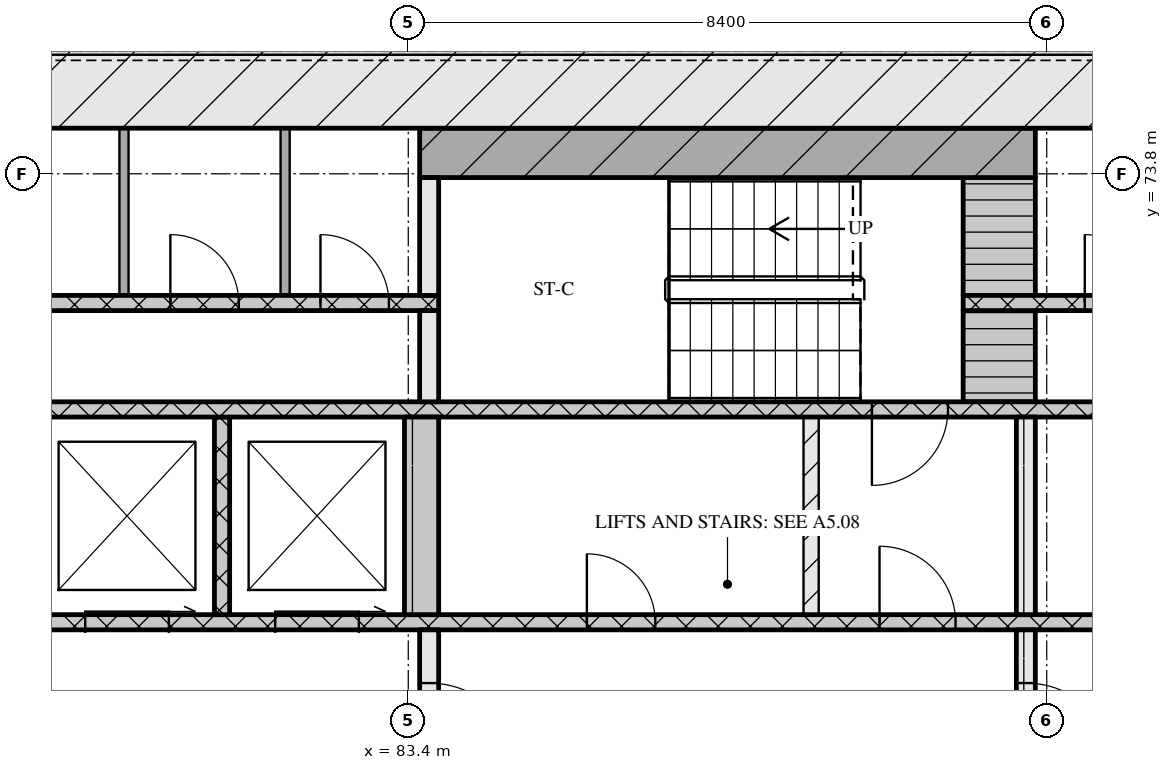
"""IFC4 building model, lengths in metres.
Left out: names, types, materials, properties, quantities, classifications, styles, units other than length and angle.
Written with IfcOpenShell. Run it as: python <this file> out.ifc"""

import sys

from ifc_helpers import new_model, si_unit, direction, frame, frame_2d, origin, place, context, subcontext, project, spatial, rectangle, extrude, element, fill, save


model = new_model("IFC4")
c1 = context("Model", 3, precision=1e-05, world=origin(), true_north=direction((0.0, 1.0)))
c2 = subcontext(c1, "Body", "Model", "MODEL_VIEW")
j1 = project(units=[si_unit("LENGTHUNIT", "METRE"), si_unit("PLANEANGLEUNIT", "RADIAN")], contexts=[c1])
p1 = place(None, origin())
s1 = spatial("IfcSite", under=j1, at=p1, CompositionType="ELEMENT")
p2 = place(p1, origin())
s2 = spatial("IfcBuilding", under=s1, at=p2, CompositionType="ELEMENT")
p3 = place(p2, frame((0.0, 0.0, 55.2)))
s3 = spatial("IfcBuildingStorey", under=s2, at=p3, CompositionType="ELEMENT", Elevation=55.2)
p4 = place(p3, frame((66.6, 75.0, 0.0), z_axis=(0.0, 0.0, 1.0), x_axis=(1.0, 0.0, 0.0)))
e1 = element("IfcWall", 1, at=p4, inside=s3, PredefinedType="SOLIDWALL", context=c2, shape_type="SweptSolid", body=[
    extrude(rectangle(XDim=42.0, YDim=1.2, at=frame_2d((21.0, 0.0))), origin(), (0.0, 0.0, 1.0), 3.32),
])
p5 = place(p3, frame((83.675, 65.2, 0.0), z_axis=(0.0, 0.0, 1.0), x_axis=(0.0, 1.0, 0.0)))
e2 = element("IfcWall", 2, at=p5, inside=s3, PredefinedType="SOLIDWALL", context=c2, shape_type="SweptSolid", body=[
    extrude(rectangle(XDim=2.6, YDim=0.25, at=frame_2d((1.3, 0.0))), origin(), (0.0, 0.0, 1.0), 3.32),
])
p6 = place(p5, frame((0.7, 0.0, 0.0)))
e3 = element("IfcOpeningElement", 3, at=p6, cuts=e2, PredefinedType="OPENING", context=c2, shape_type="SweptSolid", body=[
    extrude(rectangle(XDim=1.2, YDim=2.1, at=frame_2d((0.6, 1.05))), frame((0.0, 0.135, 0.0), z_axis=(0.0, -1.0, 0.0), x_axis=(1.0, 0.0, 0.0)), (0.0, 0.0, 1.0), 0.27),
])
p7 = place(p3, frame((91.525, 65.2, 0.0), z_axis=(0.0, 0.0, 1.0), x_axis=(0.0, 1.0, 0.0)))
e4 = element("IfcWall", 4, at=p7, inside=s3, PredefinedType="SOLIDWALL", context=c2, shape_type="SweptSolid", body=[
    extrude(rectangle(XDim=2.6, YDim=0.25, at=frame_2d((1.3, 0.0))), origin(), (0.0, 0.0, 1.0), 3.32),
])
p8 = place(p7, frame((0.7, 0.0, 0.0)))
e5 = element("IfcOpeningElement", 5, at=p8, cuts=e4, PredefinedType="OPENING", context=c2, shape_type="SweptSolid", body=[
    extrude(rectangle(XDim=1.2, YDim=2.1, at=frame_2d((0.6, 1.05))), frame((0.0, 0.135, 0.0), z_axis=(0.0, -1.0, 0.0), x_axis=(1.0, 0.0, 0.0)), (0.0, 0.0, 1.0), 0.27),
])
p9 = place(p3, frame((76.05, 67.9, 0.0), z_axis=(0.0, 0.0, 1.0), x_axis=(1.0, 0.0, 0.0)))
e6 = element("IfcWall", 6, at=p9, inside=s3, PredefinedType="SOLIDWALL", context=c2, shape_type="SweptSolid", body=[
    extrude(rectangle(XDim=23.1, YDim=0.2, at=frame_2d((11.55, 0.0))), origin(), (0.0, 0.0, 1.0), 3.32),
])
p10 = place(p9, frame((0.6, 0.0, 0.0)))
e7 = element("IfcOpeningElement", 7, at=p10, cuts=e6, PredefinedType="OPENING", context=c2, shape_type="SweptSolid", body=[
    extrude(rectangle(XDim=1.1, YDim=2.1, at=frame_2d((0.55, 1.05))), frame((0.0, 0.11, 0.0), z_axis=(0.0, -1.0, 0.0), x_axis=(1.0, 0.0, 0.0)), (0.0, 0.0, 1.0), 0.22),
])
p11 = place(p9, frame((3.1, 0.0, 0.0)))
e8 = element("IfcOpeningElement", 8, at=p11, cuts=e6, PredefinedType="OPENING", context=c2, shape_type="SweptSolid", body=[
    extrude(rectangle(XDim=1.1, YDim=2.1, at=frame_2d((0.55, 1.05))), frame((0.0, 0.11, 0.0), z_axis=(0.0, -1.0, 0.0), x_axis=(1.0, 0.0, 0.0)), (0.0, 0.0, 1.0), 0.22),
])
p12 = place(p9, frame((5.6, 0.0, 0.0)))
e9 = element("IfcOpeningElement", 9, at=p12, cuts=e6, PredefinedType="OPENING", context=c2, shape_type="SweptSolid", body=[
    extrude(rectangle(XDim=1.1, YDim=2.1, at=frame_2d((0.55, 1.05))), frame((0.0, 0.11, 0.0), z_axis=(0.0, -1.0, 0.0), x_axis=(1.0, 0.0, 0.0)), (0.0, 0.0, 1.0), 0.22),
])
p13 = place(p9, frame((9.7, 0.0, 0.0)))
e10 = element("IfcOpeningElement", 10, at=p13, cuts=e6, PredefinedType="OPENING", context=c2, shape_type="SweptSolid", body=[
    extrude(rectangle(XDim=0.9, YDim=2.1, at=frame_2d((0.45, 1.05))), frame((0.0, 0.11, 0.0), z_axis=(0.0, -1.0, 0.0), x_axis=(1.0, 0.0, 0.0)), (0.0, 0.0, 1.0), 0.22),
])
p14 = place(p9, frame((13.55, 0.0, 0.0)))
e11 = element("IfcOpeningElement", 11, at=p14, cuts=e6, PredefinedType="OPENING", context=c2, shape_type="SweptSolid", body=[
    extrude(rectangle(XDim=1.0, YDim=2.1, at=frame_2d((0.5, 1.05))), frame((0.0, 0.11, 0.0), z_axis=(0.0, -1.0, 0.0), x_axis=(1.0, 0.0, 0.0)), (0.0, 0.0, 1.0), 0.22),
])
p15 = place(p3, frame((80.95, 68.0, 0.0), z_axis=(0.0, 0.0, 1.0), x_axis=(0.0, 1.0, 0.0)))
e12 = element("IfcWall", 12, at=p15, inside=s3, PredefinedType="SOLIDWALL", context=c2, shape_type="SweptSolid", body=[
    extrude(rectangle(XDim=2.6, YDim=0.2, at=frame_2d((1.3, 0.0))), origin(), (0.0, 0.0, 1.0), 3.32),
])
p16 = place(p3, frame((83.575, 68.0, 0.0), z_axis=(0.0, 0.0, 1.0), x_axis=(0.0, 1.0, 0.0)))
e13 = element("IfcWall", 13, at=p16, inside=s3, PredefinedType="SOLIDWALL", context=c2, shape_type="SweptSolid", body=[
    extrude(rectangle(XDim=2.6, YDim=0.45, at=frame_2d((1.3, 0.0))), origin(), (0.0, 0.0, 1.0), 3.32),
])
p17 = place(p3, frame((88.7, 68.0, 0.0), z_axis=(0.0, 0.0, 1.0), x_axis=(0.0, 1.0, 0.0)))
e14 = element("IfcWall", 14, at=p17, inside=s3, PredefinedType="PARTITIONING", context=c2, shape_type="SweptSolid", body=[
    extrude(rectangle(XDim=2.6, YDim=0.2, at=frame_2d((1.3, 0.0))), origin(), (0.0, 0.0, 1.0), 3.32),
])
p18 = place(p3, frame((91.525, 68.0, 0.0), z_axis=(0.0, 0.0, 1.0), x_axis=(0.0, 1.0, 0.0)))
e15 = element("IfcWall", 15, at=p18, inside=s3, PredefinedType="SOLIDWALL", context=c2, shape_type="SweptSolid", body=[
    extrude(rectangle(XDim=2.6, YDim=0.25, at=frame_2d((1.3, 0.0))), origin(), (0.0, 0.0, 1.0), 3.32),
])
p19 = place(p3, frame((67.8, 70.7, 0.0), z_axis=(0.0, 0.0, 1.0), x_axis=(1.0, 0.0, 0.0)))
e16 = element("IfcWall", 16, at=p19, inside=s3, PredefinedType="SOLIDWALL", context=c2, shape_type="SweptSolid", body=[
    extrude(rectangle(XDim=39.6, YDim=0.2, at=frame_2d((19.8, 0.0))), origin(), (0.0, 0.0, 1.0), 3.32),
])
p20 = place(p19, frame((0.65, 0.0, 0.0)))
e17 = element("IfcOpeningElement", 17, at=p20, cuts=e16, PredefinedType="OPENING", context=c2, shape_type="SweptSolid", body=[
    extrude(rectangle(XDim=1.1, YDim=2.1, at=frame_2d((0.55, 1.05))), frame((0.0, 0.11, 0.0), z_axis=(0.0, -1.0, 0.0), x_axis=(1.0, 0.0, 0.0)), (0.0, 0.0, 1.0), 0.22),
])
p21 = place(p19, frame((3.25, 0.0, 0.0)))
e18 = element("IfcOpeningElement", 18, at=p21, cuts=e16, PredefinedType="OPENING", context=c2, shape_type="SweptSolid", body=[
    extrude(rectangle(XDim=1.1, YDim=2.1, at=frame_2d((0.55, 1.05))), frame((0.0, 0.11, 0.0), z_axis=(0.0, -1.0, 0.0), x_axis=(1.0, 0.0, 0.0)), (0.0, 0.0, 1.0), 0.22),
])
p22 = place(p19, frame((5.9, 0.0, 0.0)))
e19 = element("IfcOpeningElement", 19, at=p22, cuts=e16, PredefinedType="OPENING", context=c2, shape_type="SweptSolid", body=[
    extrude(rectangle(XDim=1.0, YDim=2.1, at=frame_2d((0.5, 1.05))), frame((0.0, 0.11, 0.0), z_axis=(0.0, -1.0, 0.0), x_axis=(1.0, 0.0, 0.0)), (0.0, 0.0, 1.0), 0.22),
])
p23 = place(p19, frame((21.7, 0.0, 0.0)))
e20 = element("IfcOpeningElement", 20, at=p23, cuts=e16, PredefinedType="OPENING", context=c2, shape_type="SweptSolid", body=[
    extrude(rectangle(XDim=1.0, YDim=2.1, at=frame_2d((0.5, 1.05))), frame((0.0, 0.11, 0.0), z_axis=(0.0, -1.0, 0.0), x_axis=(1.0, 0.0, 0.0)), (0.0, 0.0, 1.0), 0.22),
])
p24 = place(p19, frame((32.7, 0.0, 0.0)))
e21 = element("IfcOpeningElement", 21, at=p24, cuts=e16, PredefinedType="OPENING", context=c2, shape_type="SweptSolid", body=[
    extrude(rectangle(XDim=1.0, YDim=2.1, at=frame_2d((0.5, 1.05))), frame((0.0, 0.11, 0.0), z_axis=(0.0, -1.0, 0.0), x_axis=(1.0, 0.0, 0.0)), (0.0, 0.0, 1.0), 0.22),
])
p25 = place(p19, frame((35.25, 0.0, 0.0)))
e22 = element("IfcOpeningElement", 22, at=p25, cuts=e16, PredefinedType="OPENING", context=c2, shape_type="SweptSolid", body=[
    extrude(rectangle(XDim=1.1, YDim=2.1, at=frame_2d((0.55, 1.05))), frame((0.0, 0.11, 0.0), z_axis=(0.0, -1.0, 0.0), x_axis=(1.0, 0.0, 0.0)), (0.0, 0.0, 1.0), 0.22),
])
p26 = place(p19, frame((37.85, 0.0, 0.0)))
e23 = element("IfcOpeningElement", 23, at=p26, cuts=e16, PredefinedType="OPENING", context=c2, shape_type="SweptSolid", body=[
    extrude(rectangle(XDim=1.1, YDim=2.1, at=frame_2d((0.55, 1.05))), frame((0.0, 0.11, 0.0), z_axis=(0.0, -1.0, 0.0), x_axis=(1.0, 0.0, 0.0)), (0.0, 0.0, 1.0), 0.22),
])
p27 = place(p3, frame((83.675, 70.8, 0.0), z_axis=(0.0, 0.0, 1.0), x_axis=(0.0, 1.0, 0.0)))
e24 = element("IfcWall", 24, at=p27, inside=s3, PredefinedType="SOLIDWALL", context=c2, shape_type="SweptSolid", body=[
    extrude(rectangle(XDim=1.2, YDim=0.25, at=frame_2d((0.6, 0.0))), origin(), (0.0, 0.0, 1.0), 3.32),
])
p28 = place(p3, frame((91.175, 70.8, 0.0), z_axis=(0.0, 0.0, 1.0), x_axis=(0.0, 1.0, 0.0)))
e25 = element("IfcWall", 25, at=p28, inside=s3, PredefinedType="SOLIDWALL", context=c2, shape_type="SweptSolid", body=[
    extrude(rectangle(XDim=1.2, YDim=0.95, at=frame_2d((0.6, 0.0))), origin(), (0.0, 0.0, 1.0), 3.32),
])
p29 = place(p3, frame((72.8, 72.1, 0.0), z_axis=(0.0, 0.0, 1.0), x_axis=(1.0, 0.0, 0.0)))
e26 = element("IfcWall", 26, at=p29, inside=s3, PredefinedType="SOLIDWALL", context=c2, shape_type="SweptSolid", body=[
    extrude(rectangle(XDim=11.0, YDim=0.2, at=frame_2d((5.5, 0.0))), origin(), (0.0, 0.0, 1.0), 3.32),
])
p30 = place(p29, frame((1.25, 0.0, 0.0)))
e27 = element("IfcOpeningElement", 27, at=p30, cuts=e26, PredefinedType="OPENING", context=c2, shape_type="SweptSolid", body=[
    extrude(rectangle(XDim=0.9, YDim=2.1, at=frame_2d((0.45, 1.05))), frame((0.0, 0.11, 0.0), z_axis=(0.0, -1.0, 0.0), x_axis=(1.0, 0.0, 0.0)), (0.0, 0.0, 1.0), 0.22),
])
p31 = place(p29, frame((4.65, 0.0, 0.0)))
e28 = element("IfcOpeningElement", 28, at=p31, cuts=e26, PredefinedType="OPENING", context=c2, shape_type="SweptSolid", body=[
    extrude(rectangle(XDim=0.9, YDim=2.1, at=frame_2d((0.45, 1.05))), frame((0.0, 0.11, 0.0), z_axis=(0.0, -1.0, 0.0), x_axis=(1.0, 0.0, 0.0)), (0.0, 0.0, 1.0), 0.22),
])
p32 = place(p29, frame((7.47, 0.0, 0.0)))
e29 = element("IfcOpeningElement", 29, at=p32, cuts=e26, PredefinedType="OPENING", context=c2, shape_type="SweptSolid", body=[
    extrude(rectangle(XDim=0.9, YDim=2.1, at=frame_2d((0.45, 1.05))), frame((0.0, 0.11, 0.0), z_axis=(0.0, -1.0, 0.0), x_axis=(1.0, 0.0, 0.0)), (0.0, 0.0, 1.0), 0.22),
])
p33 = place(p29, frame((9.445, 0.0, 0.0)))
e30 = element("IfcOpeningElement", 30, at=p33, cuts=e26, PredefinedType="OPENING", context=c2, shape_type="SweptSolid", body=[
    extrude(rectangle(XDim=0.9, YDim=2.1, at=frame_2d((0.45, 1.05))), frame((0.0, 0.11, 0.0), z_axis=(0.0, -1.0, 0.0), x_axis=(1.0, 0.0, 0.0)), (0.0, 0.0, 1.0), 0.22),
])
p34 = place(p3, frame((90.7, 72.1, 0.0), z_axis=(0.0, 0.0, 1.0), x_axis=(1.0, 0.0, 0.0)))
e31 = element("IfcWall", 31, at=p34, inside=s3, PredefinedType="SOLIDWALL", context=c2, shape_type="SweptSolid", body=[
    extrude(rectangle(XDim=11.7, YDim=0.2, at=frame_2d((5.85, 0.0))), origin(), (0.0, 0.0, 1.0), 3.32),
])
p35 = place(p34, frame((1.6, 0.0, 0.0)))
e32 = element("IfcOpeningElement", 32, at=p35, cuts=e31, PredefinedType="OPENING", context=c2, shape_type="SweptSolid", body=[
    extrude(rectangle(XDim=0.9, YDim=2.1, at=frame_2d((0.45, 1.05))), frame((0.0, 0.11, 0.0), z_axis=(0.0, -1.0, 0.0), x_axis=(1.0, 0.0, 0.0)), (0.0, 0.0, 1.0), 0.22),
])
p36 = place(p34, frame((5.335, 0.0, 0.0)))
e33 = element("IfcOpeningElement", 33, at=p36, cuts=e31, PredefinedType="OPENING", context=c2, shape_type="SweptSolid", body=[
    extrude(rectangle(XDim=0.9, YDim=2.1, at=frame_2d((0.45, 1.05))), frame((0.0, 0.11, 0.0), z_axis=(0.0, -1.0, 0.0), x_axis=(1.0, 0.0, 0.0)), (0.0, 0.0, 1.0), 0.22),
])
p37 = place(p34, frame((9.55, 0.0, 0.0)))
e34 = element("IfcOpeningElement", 34, at=p37, cuts=e31, PredefinedType="OPENING", context=c2, shape_type="SweptSolid", body=[
    extrude(rectangle(XDim=0.9, YDim=2.1, at=frame_2d((0.45, 1.05))), frame((0.0, 0.11, 0.0), z_axis=(0.0, -1.0, 0.0), x_axis=(1.0, 0.0, 0.0)), (0.0, 0.0, 1.0), 0.22),
])
for number, where, z_axis, x_axis in (
    (35, (79.66, 72.2, 0.0), (0.0, 0.0, 1.0), (0.0, 1.0, 0.0)),
    (36, (81.78, 72.2, 0.0), (0.0, 0.0, 1.0), (0.0, 1.0, 0.0)),
):
    element("IfcWall", number, at=place(p3, frame(where, z_axis=z_axis, x_axis=x_axis)), inside=s3, PredefinedType="PARTITIONING", context=c2, shape_type="SweptSolid", body=[
        extrude(rectangle(XDim=2.2, YDim=0.12, at=frame_2d((1.1, 0.0))), origin(), (0.0, 0.0, 1.0), 3.32),
    ])
p38 = place(p3, frame((83.675, 72.2, 0.0), z_axis=(0.0, 0.0, 1.0), x_axis=(0.0, 1.0, 0.0)))
e37 = element("IfcWall", 37, at=p38, inside=s3, PredefinedType="SOLIDWALL", context=c2, shape_type="SweptSolid", body=[
    extrude(rectangle(XDim=1.55, YDim=0.25, at=frame_2d((0.775, 0.0))), origin(), (0.0, 0.0, 1.0), 3.32),
])
p39 = place(p3, frame((91.175, 72.2, 0.0), z_axis=(0.0, 0.0, 1.0), x_axis=(0.0, 1.0, 0.0)))
e38 = element("IfcWall", 38, at=p39, inside=s3, PredefinedType="SOLIDWALL", context=c2, shape_type="SweptSolid", body=[
    extrude(rectangle(XDim=1.55, YDim=0.95, at=frame_2d((0.775, 0.0))), origin(), (0.0, 0.0, 1.0), 3.32),
])
p40 = place(p3, frame((83.55, 74.075, 0.0), z_axis=(0.0, 0.0, 1.0), x_axis=(1.0, 0.0, 0.0)))
e39 = element("IfcWall", 39, at=p40, inside=s3, PredefinedType="SOLIDWALL", context=c2, shape_type="SweptSolid", body=[
    extrude(rectangle(XDim=8.1, YDim=0.65, at=frame_2d((4.05, 0.0))), origin(), (0.0, 0.0, 1.0), 3.32),
])
p41 = place(p6, origin())
e40 = element("IfcDoor", 40, at=p41, inside=s3, OperationType="SINGLE_SWING_RIGHT", PredefinedType="DOOR", context=c2, shape_type="SweptSolid", body=[
    extrude(rectangle(XDim=1.2, YDim=2.1, at=frame_2d((0.6, 1.05))), frame((0.0, 0.025, 0.0), z_axis=(0.0, -1.0, 0.0), x_axis=(1.0, 0.0, 0.0)), (0.0, 0.0, 1.0), 0.05),
])
fill(e3, e40)
p42 = place(p8, origin())
e41 = element("IfcDoor", 41, at=p42, inside=s3, OperationType="SINGLE_SWING_RIGHT", PredefinedType="DOOR", context=c2, shape_type="SweptSolid", body=[
    extrude(rectangle(XDim=1.2, YDim=2.1, at=frame_2d((0.6, 1.05))), frame((0.0, 0.025, 0.0), z_axis=(0.0, -1.0, 0.0), x_axis=(1.0, 0.0, 0.0)), (0.0, 0.0, 1.0), 0.05),
])
fill(e5, e41)
p43 = place(p11, origin())
e42 = element("IfcDoor", 42, at=p43, inside=s3, OperationType="SLIDING_TO_RIGHT", PredefinedType="DOOR", context=c2, shape_type="SweptSolid", body=[
    extrude(rectangle(XDim=1.1, YDim=2.1, at=frame_2d((0.55, 1.05))), frame((0.0, 0.025, 0.0), z_axis=(0.0, -1.0, 0.0), x_axis=(1.0, 0.0, 0.0)), (0.0, 0.0, 1.0), 0.05),
])
fill(e8, e42)
p44 = place(p12, origin())
e43 = element("IfcDoor", 43, at=p44, inside=s3, OperationType="SLIDING_TO_RIGHT", PredefinedType="DOOR", context=c2, shape_type="SweptSolid", body=[
    extrude(rectangle(XDim=1.1, YDim=2.1, at=frame_2d((0.55, 1.05))), frame((0.0, 0.025, 0.0), z_axis=(0.0, -1.0, 0.0), x_axis=(1.0, 0.0, 0.0)), (0.0, 0.0, 1.0), 0.05),
])
fill(e9, e43)
p45 = place(p13, origin())
e44 = element("IfcDoor", 44, at=p45, inside=s3, OperationType="SINGLE_SWING_LEFT", PredefinedType="DOOR", context=c2, shape_type="SweptSolid", body=[
    extrude(rectangle(XDim=0.9, YDim=2.1, at=frame_2d((0.45, 1.05))), frame((0.0, 0.025, 0.0), z_axis=(0.0, -1.0, 0.0), x_axis=(1.0, 0.0, 0.0)), (0.0, 0.0, 1.0), 0.05),
])
fill(e10, e44)
p46 = place(p14, origin())
e45 = element("IfcDoor", 45, at=p46, inside=s3, OperationType="SINGLE_SWING_LEFT", PredefinedType="DOOR", context=c2, shape_type="SweptSolid", body=[
    extrude(rectangle(XDim=1.0, YDim=2.1, at=frame_2d((0.5, 1.05))), frame((0.0, 0.025, 0.0), z_axis=(0.0, -1.0, 0.0), x_axis=(1.0, 0.0, 0.0)), (0.0, 0.0, 1.0), 0.05),
])
fill(e11, e45)
p47 = place(p23, origin())
e46 = element("IfcDoor", 46, at=p47, inside=s3, OperationType="SINGLE_SWING_RIGHT", PredefinedType="DOOR", context=c2, shape_type="SweptSolid", body=[
    extrude(rectangle(XDim=1.0, YDim=2.1, at=frame_2d((0.5, 1.05))), frame((0.0, 0.025, 0.0), z_axis=(0.0, -1.0, 0.0), x_axis=(1.0, 0.0, 0.0)), (0.0, 0.0, 1.0), 0.05),
])
fill(e20, e46)
p48 = place(p32, origin())
e47 = element("IfcDoor", 47, at=p48, inside=s3, OperationType="SINGLE_SWING_LEFT", PredefinedType="DOOR", context=c2, shape_type="SweptSolid", body=[
    extrude(rectangle(XDim=0.9, YDim=2.1, at=frame_2d((0.45, 1.05))), frame((0.0, 0.025, 0.0), z_axis=(0.0, -1.0, 0.0), x_axis=(1.0, 0.0, 0.0)), (0.0, 0.0, 1.0), 0.05),
])
fill(e29, e47)
p49 = place(p33, origin())
e48 = element("IfcDoor", 48, at=p49, inside=s3, OperationType="SINGLE_SWING_LEFT", PredefinedType="DOOR", context=c2, shape_type="SweptSolid", body=[
    extrude(rectangle(XDim=0.9, YDim=2.1, at=frame_2d((0.45, 1.05))), frame((0.0, 0.025, 0.0), z_axis=(0.0, -1.0, 0.0), x_axis=(1.0, 0.0, 0.0)), (0.0, 0.0, 1.0), 0.05),
])
fill(e30, e48)
p50 = place(p35, origin())
e49 = element("IfcDoor", 49, at=p50, inside=s3, OperationType="SINGLE_SWING_LEFT", PredefinedType="DOOR", context=c2, shape_type="SweptSolid", body=[
    extrude(rectangle(XDim=0.9, YDim=2.1, at=frame_2d((0.45, 1.05))), frame((0.0, 0.025, 0.0), z_axis=(0.0, -1.0, 0.0), x_axis=(1.0, 0.0, 0.0)), (0.0, 0.0, 1.0), 0.05),
])
fill(e32, e49)
save(model, sys.argv[1])
